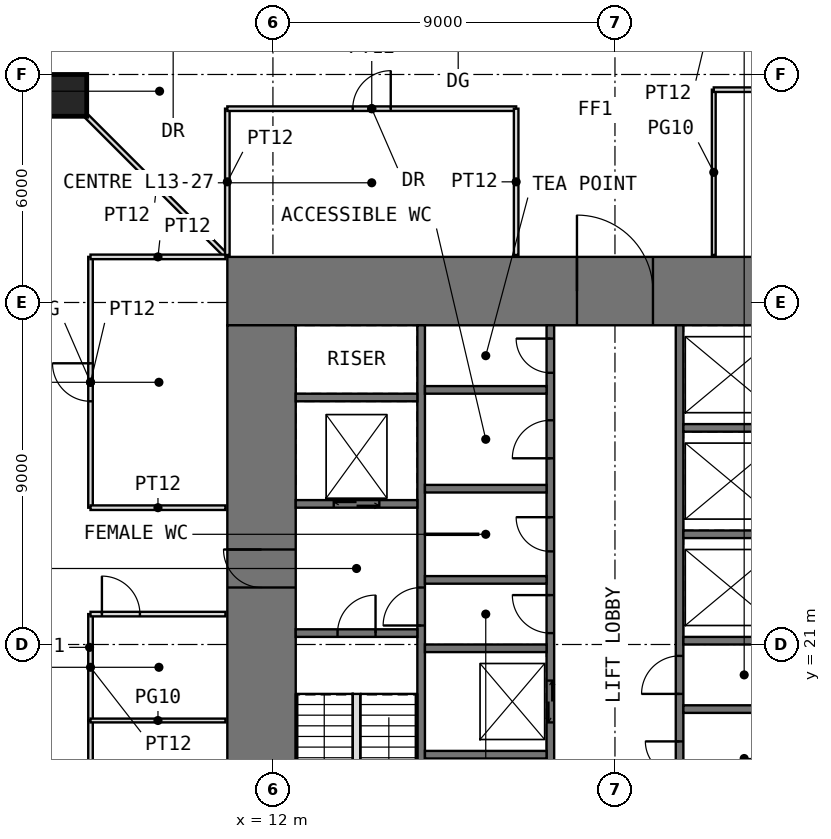
"""IFC4 building model, lengths in metres.
Left out: names, types, materials, properties, quantities, classifications, styles, units other than length and angle.
Written with IfcOpenShell. Run it as: python <this file> out.ifc"""

import sys

from ifc_helpers import new_model, si_unit, direction, frame, frame_2d, origin, origin_2d, place, context, subcontext, project, spatial, rectangle, extrude, element, fill, save


model = new_model("IFC4")
c1 = context("Model", 3, precision=1e-05, world=origin(), true_north=direction((0.0, 1.0)))
c2 = subcontext(c1, "Body", "Model", "MODEL_VIEW")
j1 = project(units=[si_unit("LENGTHUNIT", "METRE"), si_unit("PLANEANGLEUNIT", "RADIAN")], contexts=[c1])
p1 = place(None, origin())
s1 = spatial("IfcSite", under=j1, at=p1, CompositionType="ELEMENT")
p2 = place(p1, origin())
s2 = spatial("IfcBuilding", under=s1, at=p2, CompositionType="ELEMENT")
p3 = place(p2, frame((0.0, 0.0, 58.5)))
s3 = spatial("IfcBuildingStorey", under=s2, at=p3, CompositionType="ELEMENT", Elevation=58.5)
p4 = place(p3, frame((6.55, 35.45, 0.0), z_axis=(0.0, 0.0, 1.0), x_axis=(1.0, 0.0, 0.0)))
e1 = element("IfcColumn", 1, at=p4, inside=s3, PredefinedType="COLUMN", context=c2, shape_type="SweptSolid", body=[
    extrude(rectangle(XDim=1.1, YDim=1.1, at=origin_2d()), origin(), (0.0, 0.0, 1.0), 4.0),
])
p5 = place(p3, frame((10.8, 30.3, -0.05), z_axis=(0.0, 0.0, 1.0), x_axis=(1.0, 0.0, 0.0)))
e2 = element("IfcWall", 2, at=p5, inside=s3, PredefinedType="SHEAR", context=c2, shape_type="SweptSolid", body=[
    extrude(rectangle(XDim=20.4, YDim=1.8, at=frame_2d((10.2, 0.0))), origin(), (0.0, 0.0, 1.0), 4.0),
])
p6 = place(p5, frame((9.2, 0.0, 0.05)))
e3 = element("IfcOpeningElement", 3, at=p6, cuts=e2, PredefinedType="OPENING", context=c2, shape_type="SweptSolid", body=[
    extrude(rectangle(XDim=2.0, YDim=2.2, at=frame_2d((1.0, 1.1))), frame((0.0, 0.91, 0.0), z_axis=(0.0, -1.0, 0.0), x_axis=(1.0, 0.0, 0.0)), (0.0, 0.0, 1.0), 1.82),
])
p7 = place(p3, frame((11.7, 12.6, -0.05), z_axis=(0.0, 0.0, 1.0), x_axis=(0.0, 1.0, 0.0)))
e4 = element("IfcWall", 4, at=p7, inside=s3, PredefinedType="SHEAR", context=c2, shape_type="SweptSolid", body=[
    extrude(rectangle(XDim=16.8, YDim=1.8, at=frame_2d((8.4, 0.0))), origin(), (0.0, 0.0, 1.0), 4.0),
])
p8 = place(p7, frame((9.9, 0.0, 0.05)))
e5 = element("IfcOpeningElement", 5, at=p8, cuts=e4, PredefinedType="OPENING", context=c2, shape_type="SweptSolid", body=[
    extrude(rectangle(XDim=1.0, YDim=2.2, at=frame_2d((0.5, 1.1))), frame((0.0, 0.91, 0.0), z_axis=(0.0, -1.0, 0.0), x_axis=(1.0, 0.0, 0.0)), (0.0, 0.0, 1.0), 1.82),
])
p9 = place(p3, frame((15.9, 12.6, -0.05), z_axis=(0.0, 0.0, 1.0), x_axis=(0.0, 1.0, 0.0)))
e6 = element("IfcWall", 6, at=p9, inside=s3, PredefinedType="SHEAR", context=c2, shape_type="SweptSolid", body=[
    extrude(rectangle(XDim=16.8, YDim=0.2, at=frame_2d((8.4, 0.0))), origin(), (0.0, 0.0, 1.0), 4.0),
])
p10 = place(p9, frame((8.9, 0.0, 0.05)))
e7 = element("IfcOpeningElement", 7, at=p10, cuts=e6, PredefinedType="OPENING", context=c2, shape_type="SweptSolid", body=[
    extrude(rectangle(XDim=1.0, YDim=2.2, at=frame_2d((0.5, 1.1))), frame((0.0, 0.11, 0.0), z_axis=(0.0, -1.0, 0.0), x_axis=(1.0, 0.0, 0.0)), (0.0, 0.0, 1.0), 0.22),
])
p11 = place(p3, frame((19.3, 12.6, -0.05), z_axis=(0.0, 0.0, 1.0), x_axis=(0.0, 1.0, 0.0)))
e8 = element("IfcWall", 8, at=p11, inside=s3, PredefinedType="SHEAR", context=c2, shape_type="SweptSolid", body=[
    extrude(rectangle(XDim=16.8, YDim=0.2, at=frame_2d((8.4, 0.0))), origin(), (0.0, 0.0, 1.0), 4.0),
])
p12 = place(p11, frame((8.7, 0.0, 0.05)))
e9 = element("IfcOpeningElement", 9, at=p12, cuts=e8, PredefinedType="OPENING", context=c2, shape_type="SweptSolid", body=[
    extrude(rectangle(XDim=1.0, YDim=2.2, at=frame_2d((0.5, 1.1))), frame((0.0, 0.11, 0.0), z_axis=(0.0, -1.0, 0.0), x_axis=(1.0, 0.0, 0.0)), (0.0, 0.0, 1.0), 0.22),
])
p13 = place(p11, frame((10.85, 0.0, 0.05)))
e10 = element("IfcOpeningElement", 10, at=p13, cuts=e8, PredefinedType="OPENING", context=c2, shape_type="SweptSolid", body=[
    extrude(rectangle(XDim=0.9, YDim=2.2, at=frame_2d((0.45, 1.1))), frame((0.0, 0.11, 0.0), z_axis=(0.0, -1.0, 0.0), x_axis=(1.0, 0.0, 0.0)), (0.0, 0.0, 1.0), 0.22),
])
p14 = place(p11, frame((13.3, 0.0, 0.05)))
e11 = element("IfcOpeningElement", 11, at=p14, cuts=e8, PredefinedType="OPENING", context=c2, shape_type="SweptSolid", body=[
    extrude(rectangle(XDim=1.0, YDim=2.2, at=frame_2d((0.5, 1.1))), frame((0.0, 0.11, 0.0), z_axis=(0.0, -1.0, 0.0), x_axis=(1.0, 0.0, 0.0)), (0.0, 0.0, 1.0), 0.22),
])
p15 = place(p11, frame((15.55, 0.0, 0.05)))
e12 = element("IfcOpeningElement", 12, at=p15, cuts=e8, PredefinedType="OPENING", context=c2, shape_type="SweptSolid", body=[
    extrude(rectangle(XDim=0.9, YDim=2.2, at=frame_2d((0.45, 1.1))), frame((0.0, 0.11, 0.0), z_axis=(0.0, -1.0, 0.0), x_axis=(1.0, 0.0, 0.0)), (0.0, 0.0, 1.0), 0.22),
])
p16 = place(p11, frame((0.75, 0.0, 0.05)))
e13 = element("IfcOpeningElement", 13, at=p16, cuts=e8, PredefinedType="OPENING", context=c2, shape_type="SweptSolid", body=[
    extrude(rectangle(XDim=1.1, YDim=2.2, at=frame_2d((0.55, 1.1))), frame((0.0, 0.11, 0.0), z_axis=(0.0, -1.0, 0.0), x_axis=(1.0, 0.0, 0.0)), (0.0, 0.0, 1.0), 0.22),
])
p17 = place(p11, frame((3.55, 0.0, 0.05)))
e14 = element("IfcOpeningElement", 14, at=p17, cuts=e8, PredefinedType="OPENING", context=c2, shape_type="SweptSolid", body=[
    extrude(rectangle(XDim=1.1, YDim=2.2, at=frame_2d((0.55, 1.1))), frame((0.0, 0.11, 0.0), z_axis=(0.0, -1.0, 0.0), x_axis=(1.0, 0.0, 0.0)), (0.0, 0.0, 1.0), 0.22),
])
p18 = place(p11, frame((6.35, 0.0, 0.05)))
e15 = element("IfcOpeningElement", 15, at=p18, cuts=e8, PredefinedType="OPENING", context=c2, shape_type="SweptSolid", body=[
    extrude(rectangle(XDim=1.1, YDim=2.2, at=frame_2d((0.55, 1.1))), frame((0.0, 0.11, 0.0), z_axis=(0.0, -1.0, 0.0), x_axis=(1.0, 0.0, 0.0)), (0.0, 0.0, 1.0), 0.22),
])
p19 = place(p3, frame((22.7, 12.6, -0.05), z_axis=(0.0, 0.0, 1.0), x_axis=(0.0, 1.0, 0.0)))
e16 = element("IfcWall", 16, at=p19, inside=s3, PredefinedType="SHEAR", context=c2, shape_type="SweptSolid", body=[
    extrude(rectangle(XDim=16.8, YDim=0.2, at=frame_2d((8.4, 0.0))), origin(), (0.0, 0.0, 1.0), 4.0),
])
p20 = place(p19, frame((3.05, 0.0, 0.05)))
e17 = element("IfcOpeningElement", 17, at=p20, cuts=e16, PredefinedType="OPENING", context=c2, shape_type="SweptSolid", body=[
    extrude(rectangle(XDim=0.9, YDim=2.2, at=frame_2d((0.45, 1.1))), frame((0.0, 0.11, 0.0), z_axis=(0.0, -1.0, 0.0), x_axis=(1.0, 0.0, 0.0)), (0.0, 0.0, 1.0), 0.22),
])
p21 = place(p19, frame((7.1, 0.0, 0.05)))
e18 = element("IfcOpeningElement", 18, at=p21, cuts=e16, PredefinedType="OPENING", context=c2, shape_type="SweptSolid", body=[
    extrude(rectangle(XDim=1.0, YDim=2.2, at=frame_2d((0.5, 1.1))), frame((0.0, 0.11, 0.0), z_axis=(0.0, -1.0, 0.0), x_axis=(1.0, 0.0, 0.0)), (0.0, 0.0, 1.0), 0.22),
])
p22 = place(p19, frame((1.55, 0.0, 0.05)))
e19 = element("IfcOpeningElement", 19, at=p22, cuts=e16, PredefinedType="OPENING", context=c2, shape_type="SweptSolid", body=[
    extrude(rectangle(XDim=0.9, YDim=2.2, at=frame_2d((0.45, 1.1))), frame((0.0, 0.11, 0.0), z_axis=(0.0, -1.0, 0.0), x_axis=(1.0, 0.0, 0.0)), (0.0, 0.0, 1.0), 0.22),
])
p23 = place(p19, frame((4.95, 0.0, 0.05)))
e20 = element("IfcOpeningElement", 20, at=p23, cuts=e16, PredefinedType="OPENING", context=c2, shape_type="SweptSolid", body=[
    extrude(rectangle(XDim=0.9, YDim=2.2, at=frame_2d((0.45, 1.1))), frame((0.0, 0.11, 0.0), z_axis=(0.0, -1.0, 0.0), x_axis=(1.0, 0.0, 0.0)), (0.0, 0.0, 1.0), 0.22),
])
p24 = place(p3, frame((12.6, 21.3, -0.05), z_axis=(0.0, 0.0, 1.0), x_axis=(1.0, 0.0, 0.0)))
e21 = element("IfcWall", 21, at=p24, inside=s3, PredefinedType="SHEAR", context=c2, shape_type="SweptSolid", body=[
    extrude(rectangle(XDim=3.2, YDim=0.2, at=frame_2d((1.6, 0.0))), origin(), (0.0, 0.0, 1.0), 4.0),
])
p25 = place(p24, frame((1.1, 0.0, 0.05)))
e22 = element("IfcOpeningElement", 22, at=p25, cuts=e21, PredefinedType="OPENING", context=c2, shape_type="SweptSolid", body=[
    extrude(rectangle(XDim=1.0, YDim=2.2, at=frame_2d((0.5, 1.1))), frame((0.0, 0.11, 0.0), z_axis=(0.0, -1.0, 0.0), x_axis=(1.0, 0.0, 0.0)), (0.0, 0.0, 1.0), 0.22),
])
p26 = place(p3, frame((12.6, 24.7, -0.05), z_axis=(0.0, 0.0, 1.0), x_axis=(1.0, 0.0, 0.0)))
e23 = element("IfcWall", 23, at=p26, inside=s3, PredefinedType="SHEAR", context=c2, shape_type="SweptSolid", body=[
    extrude(rectangle(XDim=3.2, YDim=0.2, at=frame_2d((1.6, 0.0))), origin(), (0.0, 0.0, 1.0), 4.0),
])
p27 = place(p26, frame((1.0, 0.0, 0.05)))
e24 = element("IfcOpeningElement", 24, at=p27, cuts=e23, PredefinedType="OPENING", context=c2, shape_type="SweptSolid", body=[
    extrude(rectangle(XDim=1.2, YDim=2.2, at=frame_2d((0.6, 1.1))), frame((0.0, 0.11, 0.0), z_axis=(0.0, -1.0, 0.0), x_axis=(1.0, 0.0, 0.0)), (0.0, 0.0, 1.0), 0.22),
])
for number, where, z_axis, x_axis in (
    (25, (12.6, 27.5, -0.05), (0.0, 0.0, 1.0), (1.0, 0.0, 0.0)),
    (26, (16.0, 18.1, -0.05), (0.0, 0.0, 1.0), (1.0, 0.0, 0.0)),
    (27, (16.0, 20.9, -0.05), (0.0, 0.0, 1.0), (1.0, 0.0, 0.0)),
    (28, (16.0, 22.7, -0.05), (0.0, 0.0, 1.0), (1.0, 0.0, 0.0)),
    (29, (16.0, 25.1, -0.05), (0.0, 0.0, 1.0), (1.0, 0.0, 0.0)),
    (30, (16.0, 27.7, -0.05), (0.0, 0.0, 1.0), (1.0, 0.0, 0.0)),
    (31, (22.8, 19.3, -0.05), (0.0, 0.0, 1.0), (1.0, 0.0, 0.0)),
    (32, (22.8, 21.1, -0.05), (0.0, 0.0, 1.0), (1.0, 0.0, 0.0)),
    (33, (22.8, 23.9, -0.05), (0.0, 0.0, 1.0), (1.0, 0.0, 0.0)),
    (34, (22.8, 26.7, -0.05), (0.0, 0.0, 1.0), (1.0, 0.0, 0.0)),
):
    element("IfcWall", number, at=place(p3, frame(where, z_axis=z_axis, x_axis=x_axis)), inside=s3, PredefinedType="SHEAR", context=c2, shape_type="SweptSolid", body=[
        extrude(rectangle(XDim=3.2, YDim=0.2, at=frame_2d((1.6, 0.0))), origin(), (0.0, 0.0, 1.0), 4.0),
    ])
p28 = place(p3, frame((16.0, 23.9, 0.0), z_axis=(0.0, 0.0, 1.0), x_axis=(1.0, 0.0, 0.0)))
e35 = element("IfcWall", 35, at=p28, inside=s3, PredefinedType="PARTITIONING", context=c2, shape_type="SweptSolid", body=[
    extrude(rectangle(XDim=1.4, YDim=0.03, at=frame_2d((0.7, 0.0))), origin(), (0.0, 0.0, 1.0), 3.75),
])
p29 = place(p3, frame((7.11, 34.89, 0.0), z_axis=(0.0, 0.0, 1.0), x_axis=(0.707106781187, -0.707106781187, 0.0)))
e36 = element("IfcWall", 36, at=p29, inside=s3, PredefinedType="PARTITIONING", context=c2, shape_type="SweptSolid", body=[
    extrude(rectangle(XDim=5.168, YDim=0.12, at=frame_2d((2.584, 0.0))), origin(), (0.0, 0.0, 1.0), 3.75),
])
p30 = place(p3, frame((7.2, 14.0, 0.0), z_axis=(0.0, 0.0, 1.0), x_axis=(0.0, 1.0, 0.0)))
e37 = element("IfcWall", 37, at=p30, inside=s3, PredefinedType="PARTITIONING", context=c2, shape_type="SweptSolid", body=[
    extrude(rectangle(XDim=5.0, YDim=0.12, at=frame_2d((2.5, 0.0))), origin(), (0.0, 0.0, 1.0), 3.75),
])
p31 = place(p30, frame((2.0, 0.0, 0.0)))
e38 = element("IfcOpeningElement", 38, at=p31, cuts=e37, PredefinedType="OPENING", context=c2, shape_type="SweptSolid", body=[
    extrude(rectangle(XDim=1.0, YDim=2.4, at=frame_2d((0.5, 1.2))), frame((0.0, 0.07, 0.0), z_axis=(0.0, -1.0, 0.0), x_axis=(1.0, 0.0, 0.0)), (0.0, 0.0, 1.0), 0.14),
])
p32 = place(p3, frame((7.2, 19.0, 0.0), z_axis=(0.0, 0.0, 1.0), x_axis=(0.0, 1.0, 0.0)))
e39 = element("IfcWall", 39, at=p32, inside=s3, PredefinedType="PARTITIONING", context=c2, shape_type="SweptSolid", body=[
    extrude(rectangle(XDim=2.8, YDim=0.12, at=frame_2d((1.4, 0.0))), origin(), (0.0, 0.0, 1.0), 3.75),
])
p33 = place(p3, frame((7.2, 19.0, 0.0), z_axis=(0.0, 0.0, 1.0), x_axis=(1.0, 0.0, 0.0)))
e40 = element("IfcWall", 40, at=p33, inside=s3, PredefinedType="PARTITIONING", context=c2, shape_type="SweptSolid", body=[
    extrude(rectangle(XDim=3.55, YDim=0.1, at=frame_2d((1.775, 0.0))), origin(), (0.0, 0.0, 1.0), 3.75),
])
p34 = place(p3, frame((7.2, 21.8, 0.0), z_axis=(0.0, 0.0, 1.0), x_axis=(1.0, 0.0, 0.0)))
e41 = element("IfcWall", 41, at=p34, inside=s3, PredefinedType="PARTITIONING", context=c2, shape_type="SweptSolid", body=[
    extrude(rectangle(XDim=3.55, YDim=0.12, at=frame_2d((1.775, 0.0))), origin(), (0.0, 0.0, 1.0), 3.75),
])
p35 = place(p34, frame((0.3, 0.0, 0.0)))
e42 = element("IfcOpeningElement", 42, at=p35, cuts=e41, PredefinedType="OPENING", context=c2, shape_type="SweptSolid", body=[
    extrude(rectangle(XDim=1.0, YDim=2.4, at=frame_2d((0.5, 1.2))), frame((0.0, 0.07, 0.0), z_axis=(0.0, -1.0, 0.0), x_axis=(1.0, 0.0, 0.0)), (0.0, 0.0, 1.0), 0.14),
])
p36 = place(p3, frame((7.2, 24.6, 0.0), z_axis=(0.0, 0.0, 1.0), x_axis=(0.0, 1.0, 0.0)))
e43 = element("IfcWall", 43, at=p36, inside=s3, PredefinedType="PARTITIONING", context=c2, shape_type="SweptSolid", body=[
    extrude(rectangle(XDim=6.6, YDim=0.12, at=frame_2d((3.3, 0.0))), origin(), (0.0, 0.0, 1.0), 3.75),
])
p37 = place(p36, frame((2.8, 0.0, 0.0)))
e44 = element("IfcOpeningElement", 44, at=p37, cuts=e43, PredefinedType="OPENING", context=c2, shape_type="SweptSolid", body=[
    extrude(rectangle(XDim=1.0, YDim=2.4, at=frame_2d((0.5, 1.2))), frame((0.0, 0.07, 0.0), z_axis=(0.0, -1.0, 0.0), x_axis=(1.0, 0.0, 0.0)), (0.0, 0.0, 1.0), 0.14),
])
for number, where, z_axis, x_axis in (
    (45, (7.2, 24.6, 0.0), (0.0, 0.0, 1.0), (1.0, 0.0, 0.0)),
    (46, (7.2, 31.2, 0.0), (0.0, 0.0, 1.0), (1.0, 0.0, 0.0)),
):
    element("IfcWall", number, at=place(p3, frame(where, z_axis=z_axis, x_axis=x_axis)), inside=s3, PredefinedType="PARTITIONING", context=c2, shape_type="SweptSolid", body=[
        extrude(rectangle(XDim=3.55, YDim=0.12, at=frame_2d((1.775, 0.0))), origin(), (0.0, 0.0, 1.0), 3.75),
    ])
p38 = place(p3, frame((10.8, 31.25, 0.0), z_axis=(0.0, 0.0, 1.0), x_axis=(0.0, 1.0, 0.0)))
e47 = element("IfcWall", 47, at=p38, inside=s3, PredefinedType="PARTITIONING", context=c2, shape_type="SweptSolid", body=[
    extrude(rectangle(XDim=3.85, YDim=0.12, at=frame_2d((1.925, 0.0))), origin(), (0.0, 0.0, 1.0), 3.75),
])
p39 = place(p3, frame((10.8, 35.1, 0.0), z_axis=(0.0, 0.0, 1.0), x_axis=(1.0, 0.0, 0.0)))
e48 = element("IfcWall", 48, at=p39, inside=s3, PredefinedType="PARTITIONING", context=c2, shape_type="SweptSolid", body=[
    extrude(rectangle(XDim=7.6, YDim=0.12, at=frame_2d((3.8, 0.0))), origin(), (0.0, 0.0, 1.0), 3.75),
])
p40 = place(p39, frame((3.3, 0.0, 0.0)))
e49 = element("IfcOpeningElement", 49, at=p40, cuts=e48, PredefinedType="OPENING", context=c2, shape_type="SweptSolid", body=[
    extrude(rectangle(XDim=1.0, YDim=2.2, at=frame_2d((0.5, 1.1))), frame((0.0, 0.07, 0.0), z_axis=(0.0, -1.0, 0.0), x_axis=(1.0, 0.0, 0.0)), (0.0, 0.0, 1.0), 0.14),
])
p41 = place(p3, frame((18.4, 31.25, 0.0), z_axis=(0.0, 0.0, 1.0), x_axis=(0.0, 1.0, 0.0)))
e50 = element("IfcWall", 50, at=p41, inside=s3, PredefinedType="PARTITIONING", context=c2, shape_type="SweptSolid", body=[
    extrude(rectangle(XDim=3.85, YDim=0.12, at=frame_2d((1.925, 0.0))), origin(), (0.0, 0.0, 1.0), 3.75),
])
p42 = place(p3, frame((23.6, 31.25, 0.0), z_axis=(0.0, 0.0, 1.0), x_axis=(0.0, 1.0, 0.0)))
e51 = element("IfcWall", 51, at=p42, inside=s3, PredefinedType="PARTITIONING", context=c2, shape_type="SweptSolid", body=[
    extrude(rectangle(XDim=4.35, YDim=0.1, at=frame_2d((2.175, 0.0))), origin(), (0.0, 0.0, 1.0), 3.75),
])
p43 = place(p3, frame((23.6, 35.6, 0.0), z_axis=(0.0, 0.0, 1.0), x_axis=(1.0, 0.0, 0.0)))
e52 = element("IfcWall", 52, at=p43, inside=s3, PredefinedType="PARTITIONING", context=c2, shape_type="SweptSolid", body=[
    extrude(rectangle(XDim=7.6, YDim=0.12, at=frame_2d((3.8, 0.0))), origin(), (0.0, 0.0, 1.0), 3.75),
])
p44 = place(p43, frame((3.3, 0.0, 0.0)))
e53 = element("IfcOpeningElement", 53, at=p44, cuts=e52, PredefinedType="OPENING", context=c2, shape_type="SweptSolid", body=[
    extrude(rectangle(XDim=1.0, YDim=2.4, at=frame_2d((0.5, 1.2))), frame((0.0, 0.07, 0.0), z_axis=(0.0, -1.0, 0.0), x_axis=(1.0, 0.0, 0.0)), (0.0, 0.0, 1.0), 0.14),
])
p45 = place(p3, frame((14.2, 16.62, 0.0), z_axis=(0.0, 0.0, 1.0), x_axis=(0.0, 1.0, 0.0)))
e54 = element("IfcWall", 54, at=p45, inside=s3, PredefinedType="PARTITIONING", context=c2, shape_type="SweptSolid", body=[
    extrude(rectangle(XDim=3.08, YDim=0.2, at=frame_2d((1.54, 0.0))), origin(), (0.0, 0.0, 1.0), 4.0),
])
p46 = place(p6, origin())
e55 = element("IfcDoor", 55, at=p46, inside=s3, OperationType="DOUBLE_DOOR_SINGLE_SWING", PredefinedType="DOOR", context=c2, shape_type="SweptSolid", body=[
    extrude(rectangle(XDim=2.0, YDim=2.2, at=frame_2d((1.0, 1.1))), frame((0.0, 0.025, 0.0), z_axis=(0.0, -1.0, 0.0), x_axis=(1.0, 0.0, 0.0)), (0.0, 0.0, 1.0), 0.05),
])
fill(e3, e55)
p47 = place(p8, origin())
e56 = element("IfcDoor", 56, at=p47, inside=s3, OperationType="SINGLE_SWING_RIGHT", PredefinedType="DOOR", context=c2, shape_type="SweptSolid", body=[
    extrude(rectangle(XDim=1.0, YDim=2.2, at=frame_2d((0.5, 1.1))), frame((0.0, 0.025, 0.0), z_axis=(0.0, -1.0, 0.0), x_axis=(1.0, 0.0, 0.0)), (0.0, 0.0, 1.0), 0.05),
])
fill(e5, e56)
p48 = place(p25, origin())
e57 = element("IfcDoor", 57, at=p48, inside=s3, OperationType="SINGLE_SWING_RIGHT", PredefinedType="DOOR", context=c2, shape_type="SweptSolid", body=[
    extrude(rectangle(XDim=1.0, YDim=2.2, at=frame_2d((0.5, 1.1))), frame((0.0, 0.025, 0.0), z_axis=(0.0, -1.0, 0.0), x_axis=(1.0, 0.0, 0.0)), (0.0, 0.0, 1.0), 0.05),
])
fill(e22, e57)
p49 = place(p10, origin())
e58 = element("IfcDoor", 58, at=p49, inside=s3, OperationType="SINGLE_SWING_LEFT", PredefinedType="DOOR", context=c2, shape_type="SweptSolid", body=[
    extrude(rectangle(XDim=1.0, YDim=2.2, at=frame_2d((0.5, 1.1))), frame((0.0, 0.025, 0.0), z_axis=(0.0, -1.0, 0.0), x_axis=(1.0, 0.0, 0.0)), (0.0, 0.0, 1.0), 0.05),
])
fill(e7, e58)
p50 = place(p12, origin())
e59 = element("IfcDoor", 59, at=p50, inside=s3, OperationType="SINGLE_SWING_RIGHT", PredefinedType="DOOR", context=c2, shape_type="SweptSolid", body=[
    extrude(rectangle(XDim=1.0, YDim=2.2, at=frame_2d((0.5, 1.1))), frame((0.0, 0.025, 0.0), z_axis=(0.0, -1.0, 0.0), x_axis=(1.0, 0.0, 0.0)), (0.0, 0.0, 1.0), 0.05),
])
fill(e9, e59)
p51 = place(p21, origin())
e60 = element("IfcDoor", 60, at=p51, inside=s3, OperationType="SINGLE_SWING_LEFT", PredefinedType="DOOR", context=c2, shape_type="SweptSolid", body=[
    extrude(rectangle(XDim=1.0, YDim=2.2, at=frame_2d((0.5, 1.1))), frame((0.0, 0.025, 0.0), z_axis=(0.0, -1.0, 0.0), x_axis=(1.0, 0.0, 0.0)), (0.0, 0.0, 1.0), 0.05),
])
fill(e18, e60)
p52 = place(p13, origin())
e61 = element("IfcDoor", 61, at=p52, inside=s3, OperationType="SINGLE_SWING_RIGHT", PredefinedType="DOOR", context=c2, shape_type="SweptSolid", body=[
    extrude(rectangle(XDim=0.9, YDim=2.2, at=frame_2d((0.45, 1.1))), frame((0.0, 0.025, 0.0), z_axis=(0.0, -1.0, 0.0), x_axis=(1.0, 0.0, 0.0)), (0.0, 0.0, 1.0), 0.05),
])
fill(e10, e61)
p53 = place(p14, origin())
e62 = element("IfcDoor", 62, at=p53, inside=s3, OperationType="SINGLE_SWING_LEFT", PredefinedType="DOOR", context=c2, shape_type="SweptSolid", body=[
    extrude(rectangle(XDim=1.0, YDim=2.2, at=frame_2d((0.5, 1.1))), frame((0.0, 0.025, 0.0), z_axis=(0.0, -1.0, 0.0), x_axis=(1.0, 0.0, 0.0)), (0.0, 0.0, 1.0), 0.05),
])
fill(e11, e62)
p54 = place(p15, origin())
e63 = element("IfcDoor", 63, at=p54, inside=s3, OperationType="SINGLE_SWING_RIGHT", PredefinedType="DOOR", context=c2, shape_type="SweptSolid", body=[
    extrude(rectangle(XDim=0.9, YDim=2.2, at=frame_2d((0.45, 1.1))), frame((0.0, 0.025, 0.0), z_axis=(0.0, -1.0, 0.0), x_axis=(1.0, 0.0, 0.0)), (0.0, 0.0, 1.0), 0.05),
])
fill(e12, e63)
p55 = place(p23, origin())
e64 = element("IfcDoor", 64, at=p55, inside=s3, OperationType="SINGLE_SWING_RIGHT", PredefinedType="DOOR", context=c2, shape_type="SweptSolid", body=[
    extrude(rectangle(XDim=0.9, YDim=2.2, at=frame_2d((0.45, 1.1))), frame((0.0, 0.025, 0.0), z_axis=(0.0, -1.0, 0.0), x_axis=(1.0, 0.0, 0.0)), (0.0, 0.0, 1.0), 0.05),
])
fill(e20, e64)
p56 = place(p40, origin())
e65 = element("IfcDoor", 65, at=p56, inside=s3, OperationType="SINGLE_SWING_RIGHT", PredefinedType="DOOR", context=c2, shape_type="SweptSolid", body=[
    extrude(rectangle(XDim=1.0, YDim=2.2, at=frame_2d((0.5, 1.1))), frame((0.0, 0.025, 0.0), z_axis=(0.0, -1.0, 0.0), x_axis=(1.0, 0.0, 0.0)), (0.0, 0.0, 1.0), 0.05),
])
fill(e49, e65)
p57 = place(p37, origin())
e66 = element("IfcDoor", 66, at=p57, inside=s3, OperationType="SINGLE_SWING_RIGHT", PredefinedType="DOOR", context=c2, shape_type="SweptSolid", body=[
    extrude(rectangle(XDim=1.0, YDim=2.4, at=frame_2d((0.5, 1.2))), frame((0.0, 0.025, 0.0), z_axis=(0.0, -1.0, 0.0), x_axis=(1.0, 0.0, 0.0)), (0.0, 0.0, 1.0), 0.05),
])
fill(e44, e66)
p58 = place(p35, origin())
e67 = element("IfcDoor", 67, at=p58, inside=s3, OperationType="SINGLE_SWING_LEFT", PredefinedType="DOOR", context=c2, shape_type="SweptSolid", body=[
    extrude(rectangle(XDim=1.0, YDim=2.4, at=frame_2d((0.5, 1.2))), frame((0.0, 0.025, 0.0), z_axis=(0.0, -1.0, 0.0), x_axis=(1.0, 0.0, 0.0)), (0.0, 0.0, 1.0), 0.05),
])
fill(e42, e67)
p59 = place(p18, origin())
e68 = element("IfcDoor", 68, at=p59, inside=s3, OperationType="DOUBLE_DOOR_SLIDING", PredefinedType="DOOR", context=c2, shape_type="SweptSolid", body=[
    extrude(rectangle(XDim=1.1, YDim=2.2, at=frame_2d((0.55, 1.1))), frame((0.0, 0.025, 0.0), z_axis=(0.0, -1.0, 0.0), x_axis=(1.0, 0.0, 0.0)), (0.0, 0.0, 1.0), 0.05),
])
fill(e15, e68)
p60 = place(p27, origin())
e69 = element("IfcDoor", 69, at=p60, inside=s3, OperationType="DOUBLE_DOOR_SLIDING", PredefinedType="DOOR", context=c2, shape_type="SweptSolid", body=[
    extrude(rectangle(XDim=1.2, YDim=2.2, at=frame_2d((0.6, 1.1))), frame((0.0, 0.025, 0.0), z_axis=(0.0, -1.0, 0.0), x_axis=(1.0, 0.0, 0.0)), (0.0, 0.0, 1.0), 0.05),
])
fill(e24, e69)
save(model, sys.argv[1])
